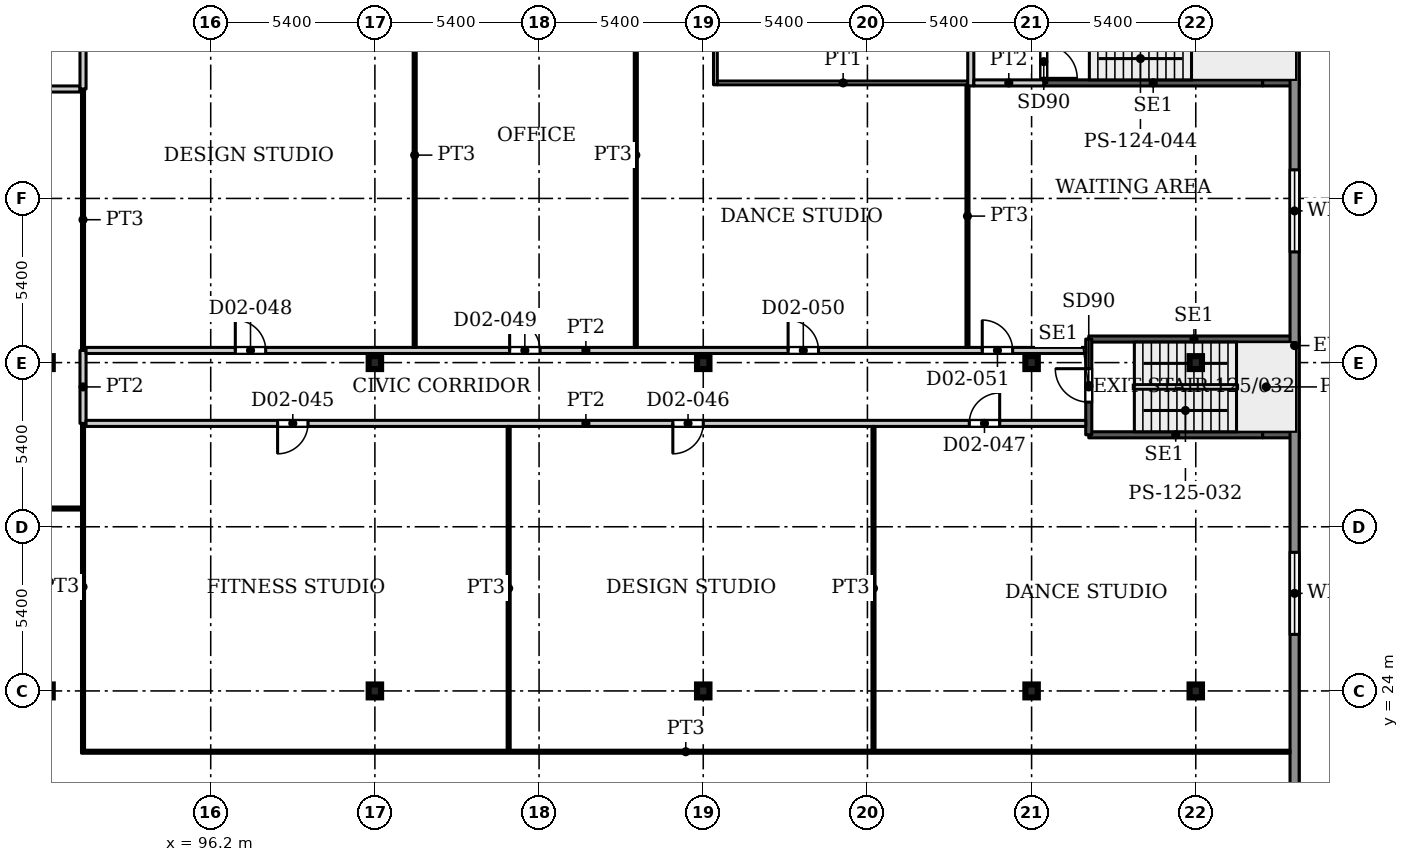
"""IFC4 building model, lengths in metres.
Left out: names, types, materials, properties, quantities, classifications, styles, units other than length and angle.
Written with IfcOpenShell. Run it as: python <this file> out.ifc"""

import sys

from ifc_helpers import new_model, si_unit, direction, frame, frame_2d, origin, origin_2d, place, context, subcontext, project, spatial, rectangle, i_section, extrude, source, transform, mapped, element, fill, save


model = new_model("IFC4")
c1 = context("Model", 3, precision=1e-05, world=origin(), true_north=direction((0.0, 1.0)))
c2 = subcontext(c1, "Body", "Model", "MODEL_VIEW")
j1 = project(units=[si_unit("LENGTHUNIT", "METRE"), si_unit("PLANEANGLEUNIT", "RADIAN")], contexts=[c1])
p1 = place(None, origin())
s1 = spatial("IfcSite", under=j1, at=p1, CompositionType="ELEMENT")
p2 = place(p1, origin())
s2 = spatial("IfcBuilding", under=s1, at=p2, CompositionType="ELEMENT")
p3 = place(p2, frame((0.0, 0.0, 12.5)))
s3 = spatial("IfcBuildingStorey", under=s2, at=p3, CompositionType="ELEMENT", Elevation=12.5)
for number, where, z_axis, x_axis in (
    (1, (90.8, 24.0, 0.0), (0.0, 0.0, 1.0), (1.0, 0.0, 0.0)),
    (2, (101.6, 24.0, 0.0), (0.0, 0.0, 1.0), (1.0, 0.0, 0.0)),
    (3, (112.4, 24.0, 0.0), (0.0, 0.0, 1.0), (1.0, 0.0, 0.0)),
    (4, (123.2, 24.0, 0.0), (0.0, 0.0, 1.0), (1.0, 0.0, 0.0)),
    (5, (128.6, 24.0, 0.0), (0.0, 0.0, 1.0), (1.0, 0.0, 0.0)),
    (6, (90.8, 34.8, 0.0), (0.0, 0.0, 1.0), (1.0, 0.0, 0.0)),
    (7, (101.6, 34.8, 0.0), (0.0, 0.0, 1.0), (1.0, 0.0, 0.0)),
    (8, (112.4, 34.8, 0.0), (0.0, 0.0, 1.0), (1.0, 0.0, 0.0)),
    (9, (123.2, 34.8, 0.0), (0.0, 0.0, 1.0), (1.0, 0.0, 0.0)),
    (10, (128.6, 34.8, 0.0), (0.0, 0.0, 1.0), (1.0, 0.0, 0.0)),
):
    element("IfcColumn", number, at=place(p3, frame(where, z_axis=z_axis, x_axis=x_axis)), inside=s3, PredefinedType="COLUMN", context=c2, shape_type="SweptSolid", body=[
        extrude(i_section(OverallWidth=0.409, OverallDepth=0.425, WebThickness=0.033, FlangeThickness=0.052, FilletRadius=0.013, at=origin_2d()), origin(), (0.0, 0.0, 1.0), 4.5),
    ])
p4 = place(p3, frame((131.85, 54.72, 0.0), z_axis=(0.0, 0.0, 1.0), x_axis=(0.0, -1.0, 0.0)))
e11 = element("IfcWall", 11, at=p4, inside=s3, PredefinedType="SOLIDWALL", context=c2, shape_type="SweptSolid", body=[
    extrude(rectangle(XDim=38.72, YDim=0.3, at=frame_2d((19.36, 0.0))), origin(), (0.0, 0.0, 1.0), 4.25),
])
p5 = place(p4, frame((2.435, 0.0, 0.9)))
e12 = element("IfcOpeningElement", 12, at=p5, cuts=e11, PredefinedType="OPENING", context=c2, shape_type="SweptSolid", body=[
    extrude(rectangle(XDim=2.7, YDim=2.1, at=frame_2d((1.35, 1.05))), frame((0.0, 0.16, 0.0), z_axis=(0.0, -1.0, 0.0), x_axis=(1.0, 0.0, 0.0)), (0.0, 0.0, 1.0), 0.32),
])
p6 = place(p4, frame((13.58, 0.0, 0.9)))
e13 = element("IfcOpeningElement", 13, at=p6, cuts=e11, PredefinedType="OPENING", context=c2, shape_type="SweptSolid", body=[
    extrude(rectangle(XDim=2.7, YDim=2.1, at=frame_2d((1.35, 1.05))), frame((0.0, 0.16, 0.0), z_axis=(0.0, -1.0, 0.0), x_axis=(1.0, 0.0, 0.0)), (0.0, 0.0, 1.0), 0.32),
])
p7 = place(p4, frame((26.16, 0.0, 0.9)))
e14 = element("IfcOpeningElement", 14, at=p7, cuts=e11, PredefinedType="OPENING", context=c2, shape_type="SweptSolid", body=[
    extrude(rectangle(XDim=2.7, YDim=2.1, at=frame_2d((1.35, 1.05))), frame((0.0, 0.16, 0.0), z_axis=(0.0, -1.0, 0.0), x_axis=(1.0, 0.0, 0.0)), (0.0, 0.0, 1.0), 0.32),
])
p8 = place(p3, frame((123.6, 44.0, 0.0), z_axis=(0.0, 0.0, 1.0), x_axis=(1.0, 0.0, 0.0)))
e15 = element("IfcWall", 15, at=p8, inside=s3, PredefinedType="SHEAR", context=c2, shape_type="SweptSolid", body=[
    extrude(rectangle(XDim=7.2, YDim=0.2, at=frame_2d((3.6, 0.0))), origin(), (0.0, 0.0, 1.0), 4.5),
])
p9 = place(p3, frame((130.8, 44.0, 0.0), z_axis=(0.0, 0.0, 1.0), x_axis=(1.0, 0.0, 0.0)))
e16 = element("IfcWall", 16, at=p9, inside=s3, PredefinedType="SHEAR", context=c2, shape_type="SweptSolid", body=[
    extrude(rectangle(XDim=1.2, YDim=0.2, at=frame_2d((0.6, 0.0))), origin(), (0.0, 0.0, 1.0), 4.5),
])
p10 = place(p3, frame((123.6, 44.0, 0.0), z_axis=(0.0, 0.0, 1.0), x_axis=(0.0, 1.0, 0.0)))
e17 = element("IfcWall", 17, at=p10, inside=s3, PredefinedType="SHEAR", context=c2, shape_type="SweptSolid", body=[
    extrude(rectangle(XDim=3.15, YDim=0.2, at=frame_2d((1.575, 0.0))), origin(), (0.0, 0.0, 1.0), 4.5),
])
p11 = place(p10, frame((0.15, 0.0, 0.0)))
e18 = element("IfcOpeningElement", 18, at=p11, cuts=e17, PredefinedType="OPENING", context=c2, shape_type="SweptSolid", body=[
    extrude(rectangle(XDim=1.1, YDim=2.2, at=frame_2d((0.55, 1.1))), frame((0.0, 0.11, 0.0), z_axis=(0.0, -1.0, 0.0), x_axis=(1.0, 0.0, 0.0)), (0.0, 0.0, 1.0), 0.22),
])
p12 = place(p3, frame((125.08, 32.425, 0.0), z_axis=(0.0, 0.0, 1.0), x_axis=(1.0, 0.0, 0.0)))
e19 = element("IfcWall", 19, at=p12, inside=s3, PredefinedType="SHEAR", context=c2, shape_type="SweptSolid", body=[
    extrude(rectangle(XDim=5.72, YDim=0.2, at=frame_2d((2.86, 0.0))), origin(), (0.0, 0.0, 1.0), 4.5),
])
p13 = place(p3, frame((130.8, 32.425, 0.0), z_axis=(0.0, 0.0, 1.0), x_axis=(1.0, 0.0, 0.0)))
e20 = element("IfcWall", 20, at=p13, inside=s3, PredefinedType="SHEAR", context=c2, shape_type="SweptSolid", body=[
    extrude(rectangle(XDim=1.2, YDim=0.2, at=frame_2d((0.6, 0.0))), origin(), (0.0, 0.0, 1.0), 4.5),
])
p14 = place(p3, frame((125.08, 35.575, 0.0), z_axis=(0.0, 0.0, 1.0), x_axis=(1.0, 0.0, 0.0)))
e21 = element("IfcWall", 21, at=p14, inside=s3, PredefinedType="SHEAR", context=c2, shape_type="SweptSolid", body=[
    extrude(rectangle(XDim=6.92, YDim=0.2, at=frame_2d((3.46, 0.0))), origin(), (0.0, 0.0, 1.0), 4.5),
])
p15 = place(p3, frame((125.08, 32.425, 0.0), z_axis=(0.0, 0.0, 1.0), x_axis=(0.0, 1.0, 0.0)))
e22 = element("IfcWall", 22, at=p15, inside=s3, PredefinedType="SHEAR", context=c2, shape_type="SweptSolid", body=[
    extrude(rectangle(XDim=3.15, YDim=0.2, at=frame_2d((1.575, 0.0))), origin(), (0.0, 0.0, 1.0), 4.5),
])
p16 = place(p15, frame((1.075, 0.0, 0.0)))
e23 = element("IfcOpeningElement", 23, at=p16, cuts=e22, PredefinedType="OPENING", context=c2, shape_type="SweptSolid", body=[
    extrude(rectangle(XDim=1.1, YDim=2.2, at=frame_2d((0.55, 1.1))), frame((0.0, 0.11, 0.0), z_axis=(0.0, -1.0, 0.0), x_axis=(1.0, 0.0, 0.0)), (0.0, 0.0, 1.0), 0.22),
])
p17 = place(p3, frame((53.649, 30.0, 0.0), z_axis=(0.0, 0.0, 1.0), x_axis=(1.0, 0.0, 0.0)))
e24 = element("IfcWall", 24, at=p17, inside=s3, PredefinedType="PARTITIONING", context=c2, shape_type="SweptSolid", body=[
    extrude(rectangle(XDim=38.301, YDim=0.1, at=frame_2d((19.15, 0.0))), origin(), (0.0, 0.0, 1.0), 4.18),
])
p18 = place(p3, frame((67.5, 43.8, 0.0), z_axis=(0.0, 0.0, 1.0), x_axis=(1.0, 0.0, 0.0)))
e25 = element("IfcWall", 25, at=p18, inside=s3, PredefinedType="PARTITIONING", context=c2, shape_type="SweptSolid", body=[
    extrude(rectangle(XDim=24.4, YDim=0.2, at=frame_2d((12.2, 0.0))), origin(), (0.0, 0.0, 1.0), 4.18),
])
p19 = place(p18, frame((11.3, 0.0, 0.0)))
e26 = element("IfcOpeningElement", 26, at=p19, cuts=e25, PredefinedType="OPENING", context=c2, shape_type="SweptSolid", body=[
    extrude(rectangle(XDim=1.8, YDim=2.1, at=frame_2d((0.9, 1.05))), frame((0.0, 0.11, 0.0), z_axis=(0.0, -1.0, 0.0), x_axis=(1.0, 0.0, 0.0)), (0.0, 0.0, 1.0), 0.22),
])
p20 = place(p3, frame((91.95, 22.0, 0.0), z_axis=(0.0, 0.0, 1.0), x_axis=(1.0, 0.0, 0.0)))
e27 = element("IfcWall", 27, at=p20, inside=s3, PredefinedType="PARTITIONING", context=c2, shape_type="SweptSolid", body=[
    extrude(rectangle(XDim=39.751, YDim=0.1, at=frame_2d((19.875, 0.0))), origin(), (0.0, 0.0, 1.0), 4.18),
])
p21 = place(p3, frame((92.0, 22.05, 0.0), z_axis=(0.0, 0.0, 1.0), x_axis=(0.0, 1.0, 0.0)))
e28 = element("IfcWall", 28, at=p21, inside=s3, PredefinedType="PARTITIONING", context=c2, shape_type="SweptSolid", body=[
    extrude(rectangle(XDim=10.75, YDim=0.1, at=frame_2d((5.375, 0.0))), origin(), (0.0, 0.0, 1.0), 4.18),
])
p22 = place(p3, frame((92.0, 32.8, 0.0), z_axis=(0.0, 0.0, 1.0), x_axis=(0.0, 1.0, 0.0)))
e29 = element("IfcWall", 29, at=p22, inside=s3, PredefinedType="PARTITIONING", context=c2, shape_type="SweptSolid", body=[
    extrude(rectangle(XDim=2.4, YDim=0.2, at=frame_2d((1.2, 0.0))), origin(), (0.0, 0.0, 1.0), 4.18),
])
p23 = place(p3, frame((92.0, 35.2, 0.0), z_axis=(0.0, 0.0, 1.0), x_axis=(0.0, 1.0, 0.0)))
e30 = element("IfcWall", 30, at=p23, inside=s3, PredefinedType="PARTITIONING", context=c2, shape_type="SweptSolid", body=[
    extrude(rectangle(XDim=8.6, YDim=0.1, at=frame_2d((4.3, 0.0))), origin(), (0.0, 0.0, 1.0), 4.18),
])
p24 = place(p3, frame((92.0, 43.8, 0.0), z_axis=(0.0, 0.0, 1.0), x_axis=(0.0, 1.0, 0.0)))
e31 = element("IfcWall", 31, at=p24, inside=s3, PredefinedType="PARTITIONING", context=c2, shape_type="SweptSolid", body=[
    extrude(rectangle(XDim=4.3, YDim=0.2, at=frame_2d((2.15, 0.0))), origin(), (0.0, 0.0, 1.0), 4.18),
])
p25 = place(p3, frame((92.1, 32.8, 0.0), z_axis=(0.0, 0.0, 1.0), x_axis=(1.0, 0.0, 0.0)))
e32 = element("IfcWall", 32, at=p25, inside=s3, PredefinedType="PARTITIONING", context=c2, shape_type="SweptSolid", body=[
    extrude(rectangle(XDim=32.881, YDim=0.2, at=frame_2d((16.44, 0.0))), origin(), (0.0, 0.0, 1.0), 4.18),
])
p26 = place(p25, frame((6.3, 0.0, 0.0)))
e33 = element("IfcOpeningElement", 33, at=p26, cuts=e32, PredefinedType="OPENING", context=c2, shape_type="SweptSolid", body=[
    extrude(rectangle(XDim=1.0, YDim=2.1, at=frame_2d((0.5, 1.05))), frame((0.0, 0.11, 0.0), z_axis=(0.0, -1.0, 0.0), x_axis=(1.0, 0.0, 0.0)), (0.0, 0.0, 1.0), 0.22),
])
p27 = place(p25, frame((19.3, 0.0, 0.0)))
e34 = element("IfcOpeningElement", 34, at=p27, cuts=e32, PredefinedType="OPENING", context=c2, shape_type="SweptSolid", body=[
    extrude(rectangle(XDim=1.0, YDim=2.1, at=frame_2d((0.5, 1.05))), frame((0.0, 0.11, 0.0), z_axis=(0.0, -1.0, 0.0), x_axis=(1.0, 0.0, 0.0)), (0.0, 0.0, 1.0), 0.22),
])
p28 = place(p25, frame((29.05, 0.0, 0.0)))
e35 = element("IfcOpeningElement", 35, at=p28, cuts=e32, PredefinedType="OPENING", context=c2, shape_type="SweptSolid", body=[
    extrude(rectangle(XDim=1.0, YDim=2.1, at=frame_2d((0.5, 1.05))), frame((0.0, 0.11, 0.0), z_axis=(0.0, -1.0, 0.0), x_axis=(1.0, 0.0, 0.0)), (0.0, 0.0, 1.0), 0.22),
])
p29 = place(p3, frame((92.1, 35.2, 0.0), z_axis=(0.0, 0.0, 1.0), x_axis=(1.0, 0.0, 0.0)))
e36 = element("IfcWall", 36, at=p29, inside=s3, PredefinedType="PARTITIONING", context=c2, shape_type="SweptSolid", body=[
    extrude(rectangle(XDim=32.88, YDim=0.2, at=frame_2d((16.44, 0.0))), origin(), (0.0, 0.0, 1.0), 4.18),
])
p30 = place(p29, frame((4.909, 0.0, 0.0)))
e37 = element("IfcOpeningElement", 37, at=p30, cuts=e36, PredefinedType="OPENING", context=c2, shape_type="SweptSolid", body=[
    extrude(rectangle(XDim=1.0, YDim=2.1, at=frame_2d((0.5, 1.05))), frame((0.0, 0.11, 0.0), z_axis=(0.0, -1.0, 0.0), x_axis=(1.0, 0.0, 0.0)), (0.0, 0.0, 1.0), 0.22),
])
p31 = place(p29, frame((13.932, 0.0, 0.0)))
e38 = element("IfcOpeningElement", 38, at=p31, cuts=e36, PredefinedType="OPENING", context=c2, shape_type="SweptSolid", body=[
    extrude(rectangle(XDim=1.0, YDim=2.1, at=frame_2d((0.5, 1.05))), frame((0.0, 0.11, 0.0), z_axis=(0.0, -1.0, 0.0), x_axis=(1.0, 0.0, 0.0)), (0.0, 0.0, 1.0), 0.22),
])
p32 = place(p29, frame((23.091, 0.0, 0.0)))
e39 = element("IfcOpeningElement", 39, at=p32, cuts=e36, PredefinedType="OPENING", context=c2, shape_type="SweptSolid", body=[
    extrude(rectangle(XDim=1.0, YDim=2.1, at=frame_2d((0.5, 1.05))), frame((0.0, 0.11, 0.0), z_axis=(0.0, -1.0, 0.0), x_axis=(1.0, 0.0, 0.0)), (0.0, 0.0, 1.0), 0.22),
])
p33 = place(p29, frame((29.477, 0.0, 0.0)))
e40 = element("IfcOpeningElement", 40, at=p33, cuts=e36, PredefinedType="OPENING", context=c2, shape_type="SweptSolid", body=[
    extrude(rectangle(XDim=1.0, YDim=2.1, at=frame_2d((0.5, 1.05))), frame((0.0, 0.11, 0.0), z_axis=(0.0, -1.0, 0.0), x_axis=(1.0, 0.0, 0.0)), (0.0, 0.0, 1.0), 0.22),
])
p34 = place(p3, frame((102.909, 35.3, 0.0), z_axis=(0.0, 0.0, 1.0), x_axis=(0.0, 1.0, 0.0)))
e41 = element("IfcWall", 41, at=p34, inside=s3, PredefinedType="PARTITIONING", context=c2, shape_type="SweptSolid", body=[
    extrude(rectangle(XDim=12.65, YDim=0.1, at=frame_2d((6.325, 0.0))), origin(), (0.0, 0.0, 1.0), 4.18),
])
p35 = place(p3, frame((106.0, 22.05, 0.0), z_axis=(0.0, 0.0, 1.0), x_axis=(0.0, 1.0, 0.0)))
e42 = element("IfcWall", 42, at=p35, inside=s3, PredefinedType="PARTITIONING", context=c2, shape_type="SweptSolid", body=[
    extrude(rectangle(XDim=10.65, YDim=0.1, at=frame_2d((5.325, 0.0))), origin(), (0.0, 0.0, 1.0), 4.18),
])
p36 = place(p3, frame((110.182, 35.3, 0.0), z_axis=(0.0, 0.0, 1.0), x_axis=(0.0, 1.0, 0.0)))
e43 = element("IfcWall", 43, at=p36, inside=s3, PredefinedType="PARTITIONING", context=c2, shape_type="SweptSolid", body=[
    extrude(rectangle(XDim=12.65, YDim=0.1, at=frame_2d((6.325, 0.0))), origin(), (0.0, 0.0, 1.0), 4.18),
])
p37 = place(p3, frame((112.8, 43.938, 0.0), z_axis=(0.0, 0.0, 1.0), x_axis=(0.0, 1.0, 0.0)))
e44 = element("IfcWall", 44, at=p37, inside=s3, PredefinedType="PARTITIONING", context=c2, shape_type="SweptSolid", body=[
    extrude(rectangle(XDim=46.787, YDim=0.125, at=frame_2d((23.394, 0.0))), origin(), (0.0, 0.0, 1.0), 4.18),
])
p38 = place(p3, frame((112.862, 44.0, 0.0), z_axis=(0.0, 0.0, 1.0), x_axis=(1.0, 0.0, 0.0)))
e45 = element("IfcWall", 45, at=p38, inside=s3, PredefinedType="PARTITIONING", context=c2, shape_type="SweptSolid", body=[
    extrude(rectangle(XDim=8.279, YDim=0.125, at=frame_2d((4.14, 0.0))), origin(), (0.0, 0.0, 1.0), 4.18),
])
p39 = place(p3, frame((118.0, 22.05, 0.0), z_axis=(0.0, 0.0, 1.0), x_axis=(0.0, 1.0, 0.0)))
e46 = element("IfcWall", 46, at=p39, inside=s3, PredefinedType="PARTITIONING", context=c2, shape_type="SweptSolid", body=[
    extrude(rectangle(XDim=10.65, YDim=0.1, at=frame_2d((5.325, 0.0))), origin(), (0.0, 0.0, 1.0), 4.18),
])
p40 = place(p3, frame((121.091, 35.3, 0.0), z_axis=(0.0, 0.0, 1.0), x_axis=(0.0, 1.0, 0.0)))
e47 = element("IfcWall", 47, at=p40, inside=s3, PredefinedType="PARTITIONING", context=c2, shape_type="SweptSolid", body=[
    extrude(rectangle(XDim=8.638, YDim=0.1, at=frame_2d((4.319, 0.0))), origin(), (0.0, 0.0, 1.0), 4.18),
])
p41 = place(p3, frame((121.2, 43.9, 0.0), z_axis=(0.0, 0.0, 1.0), x_axis=(0.0, 1.0, 0.0)))
e48 = element("IfcWall", 48, at=p41, inside=s3, PredefinedType="PARTITIONING", context=c2, shape_type="SweptSolid", body=[
    extrude(rectangle(XDim=22.6, YDim=0.2, at=frame_2d((11.3, 0.0))), origin(), (0.0, 0.0, 1.0), 4.18),
])
p42 = place(p41, frame((6.112, 0.0, 0.0)))
e49 = element("IfcOpeningElement", 49, at=p42, cuts=e48, PredefinedType="OPENING", context=c2, shape_type="SweptSolid", body=[
    extrude(rectangle(XDim=1.0, YDim=2.1, at=frame_2d((0.5, 1.05))), frame((0.0, 0.11, 0.0), z_axis=(0.0, -1.0, 0.0), x_axis=(1.0, 0.0, 0.0)), (0.0, 0.0, 1.0), 0.22),
])
p43 = place(p41, frame((17.45, 0.0, 0.0)))
e50 = element("IfcOpeningElement", 50, at=p43, cuts=e48, PredefinedType="OPENING", context=c2, shape_type="SweptSolid", body=[
    extrude(rectangle(XDim=1.0, YDim=2.1, at=frame_2d((0.5, 1.05))), frame((0.0, 0.11, 0.0), z_axis=(0.0, -1.0, 0.0), x_axis=(1.0, 0.0, 0.0)), (0.0, 0.0, 1.0), 0.22),
])
p44 = place(p3, frame((121.3, 44.0, 0.0), z_axis=(0.0, 0.0, 1.0), x_axis=(1.0, 0.0, 0.0)))
e51 = element("IfcWall", 51, at=p44, inside=s3, PredefinedType="PARTITIONING", context=c2, shape_type="SweptSolid", body=[
    extrude(rectangle(XDim=2.3, YDim=0.2, at=frame_2d((1.15, 0.0))), origin(), (0.0, 0.0, 1.0), 4.18),
])
m1 = source(origin(), c2, "Body", "SweptSolid", [
    extrude(rectangle(XDim=2.7, YDim=2.1, at=frame_2d((1.35, 1.05))), frame((0.0, 0.03, 0.0), z_axis=(0.0, -1.0, 0.0), x_axis=(1.0, 0.0, 0.0)), (0.0, 0.0, 1.0), 0.06),
])
p45 = place(p6, origin())
e52 = element("IfcWindow", 52, at=p45, inside=s3, PartitioningType="SINGLE_PANEL", PredefinedType="WINDOW", context=c2, shape_type="MappedRepresentation", body=[
    mapped(m1, transform((0.0, 0.0, 0.0), x_axis=(1.0, 0.0, 0.0), y_axis=(0.0, 1.0, 0.0), z_axis=(0.0, 0.0, 1.0), scale=1.0)),
])
fill(e13, e52)
p46 = place(p7, origin())
e53 = element("IfcWindow", 53, at=p46, inside=s3, PartitioningType="SINGLE_PANEL", PredefinedType="WINDOW", context=c2, shape_type="MappedRepresentation", body=[
    mapped(m1, transform((0.0, 0.0, 0.0), x_axis=(1.0, 0.0, 0.0), y_axis=(0.0, 1.0, 0.0), z_axis=(0.0, 0.0, 1.0), scale=1.0)),
])
fill(e14, e53)
m2 = source(origin(), c2, "Body", "SweptSolid", [
    extrude(rectangle(XDim=1.1, YDim=2.2, at=frame_2d((0.55, 1.1))), frame((0.0, 0.025, 0.0), z_axis=(0.0, -1.0, 0.0), x_axis=(1.0, 0.0, 0.0)), (0.0, 0.0, 1.0), 0.05),
])
p47 = place(p11, origin())
e54 = element("IfcDoor", 54, at=p47, inside=s3, OperationType="SINGLE_SWING_RIGHT", PredefinedType="DOOR", context=c2, shape_type="MappedRepresentation", body=[
    mapped(m2, transform((0.0, 0.0, 0.0), x_axis=(1.0, 0.0, 0.0), y_axis=(0.0, 1.0, 0.0), z_axis=(0.0, 0.0, 1.0), scale=1.0)),
])
fill(e18, e54)
p48 = place(p16, origin())
e55 = element("IfcDoor", 55, at=p48, inside=s3, OperationType="SINGLE_SWING_LEFT", PredefinedType="DOOR", context=c2, shape_type="MappedRepresentation", body=[
    mapped(m2, transform((0.0, 0.0, 0.0), x_axis=(1.0, 0.0, 0.0), y_axis=(0.0, 1.0, 0.0), z_axis=(0.0, 0.0, 1.0), scale=1.0)),
])
fill(e23, e55)
m3 = source(origin(), c2, "Body", "SweptSolid", [
    extrude(rectangle(XDim=1.0, YDim=2.1, at=frame_2d((0.5, 1.05))), frame((0.0, 0.025, 0.0), z_axis=(0.0, -1.0, 0.0), x_axis=(1.0, 0.0, 0.0)), (0.0, 0.0, 1.0), 0.05),
])
p49 = place(p26, origin())
e56 = element("IfcDoor", 56, at=p49, inside=s3, OperationType="SINGLE_SWING_RIGHT", PredefinedType="DOOR", context=c2, shape_type="MappedRepresentation", body=[
    mapped(m3, transform((0.0, 0.0, 0.0), x_axis=(1.0, 0.0, 0.0), y_axis=(0.0, 1.0, 0.0), z_axis=(0.0, 0.0, 1.0), scale=1.0)),
])
fill(e33, e56)
p50 = place(p27, origin())
e57 = element("IfcDoor", 57, at=p50, inside=s3, OperationType="SINGLE_SWING_RIGHT", PredefinedType="DOOR", context=c2, shape_type="MappedRepresentation", body=[
    mapped(m3, transform((0.0, 0.0, 0.0), x_axis=(1.0, 0.0, 0.0), y_axis=(0.0, 1.0, 0.0), z_axis=(0.0, 0.0, 1.0), scale=1.0)),
])
fill(e34, e57)
p51 = place(p28, origin())
e58 = element("IfcDoor", 58, at=p51, inside=s3, OperationType="SINGLE_SWING_LEFT", PredefinedType="DOOR", context=c2, shape_type="MappedRepresentation", body=[
    mapped(m3, transform((0.0, 0.0, 0.0), x_axis=(1.0, 0.0, 0.0), y_axis=(0.0, 1.0, 0.0), z_axis=(0.0, 0.0, 1.0), scale=1.0)),
])
fill(e35, e58)
p52 = place(p30, origin())
e59 = element("IfcDoor", 59, at=p52, inside=s3, OperationType="SINGLE_SWING_LEFT", PredefinedType="DOOR", context=c2, shape_type="MappedRepresentation", body=[
    mapped(m3, transform((0.0, 0.0, 0.0), x_axis=(1.0, 0.0, 0.0), y_axis=(0.0, 1.0, 0.0), z_axis=(0.0, 0.0, 1.0), scale=1.0)),
])
fill(e37, e59)
p53 = place(p31, origin())
e60 = element("IfcDoor", 60, at=p53, inside=s3, OperationType="SINGLE_SWING_LEFT", PredefinedType="DOOR", context=c2, shape_type="MappedRepresentation", body=[
    mapped(m3, transform((0.0, 0.0, 0.0), x_axis=(1.0, 0.0, 0.0), y_axis=(0.0, 1.0, 0.0), z_axis=(0.0, 0.0, 1.0), scale=1.0)),
])
fill(e38, e60)
p54 = place(p32, origin())
e61 = element("IfcDoor", 61, at=p54, inside=s3, OperationType="SINGLE_SWING_LEFT", PredefinedType="DOOR", context=c2, shape_type="MappedRepresentation", body=[
    mapped(m3, transform((0.0, 0.0, 0.0), x_axis=(1.0, 0.0, 0.0), y_axis=(0.0, 1.0, 0.0), z_axis=(0.0, 0.0, 1.0), scale=1.0)),
])
fill(e39, e61)
p55 = place(p33, origin())
e62 = element("IfcDoor", 62, at=p55, inside=s3, OperationType="SINGLE_SWING_LEFT", PredefinedType="DOOR", context=c2, shape_type="MappedRepresentation", body=[
    mapped(m3, transform((0.0, 0.0, 0.0), x_axis=(1.0, 0.0, 0.0), y_axis=(0.0, 1.0, 0.0), z_axis=(0.0, 0.0, 1.0), scale=1.0)),
])
fill(e40, e62)
save(model, sys.argv[1])
